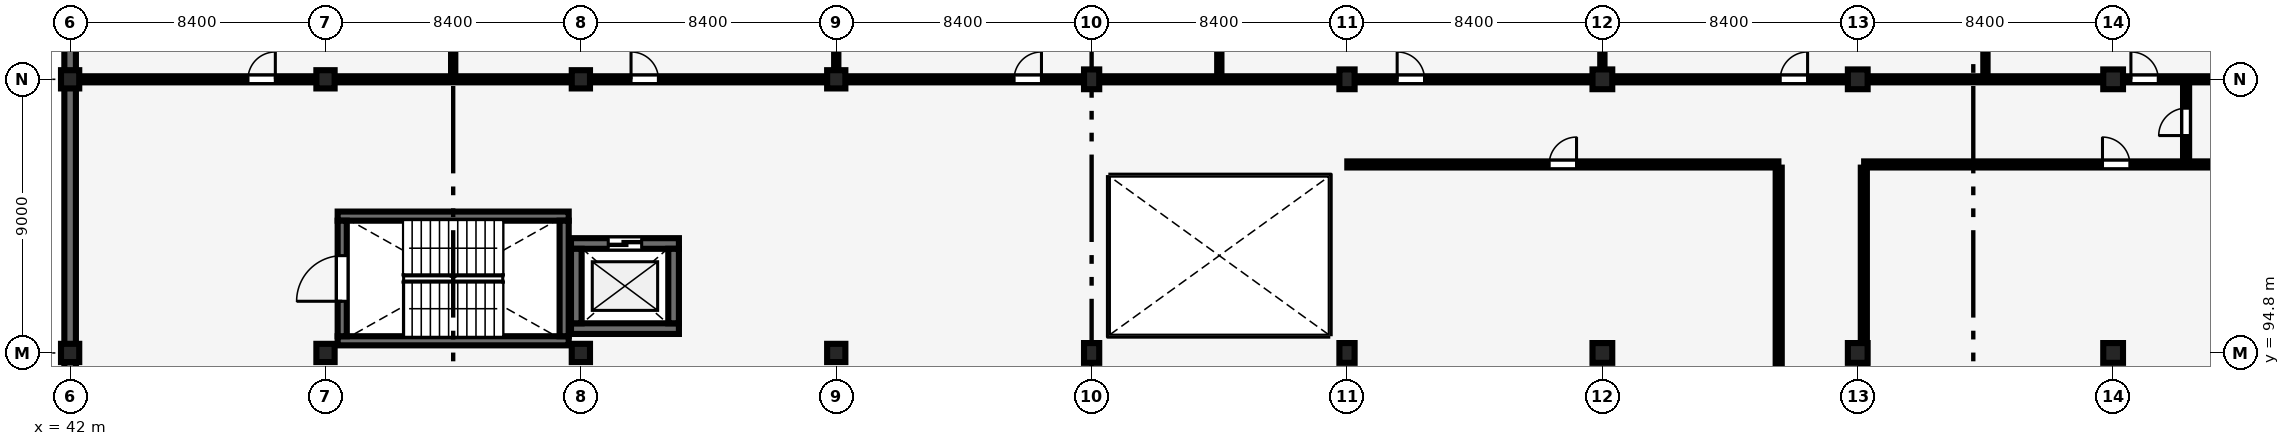
"""IFC4 building model, lengths in metres.
Left out: names, types, materials, properties, quantities, classifications, styles, units other than length and angle.
Written with IfcOpenShell. Run it as: python <this file> out.ifc"""

import sys

from ifc_helpers import new_model, si_unit, direction, frame, frame_2d, origin, origin_2d, place, context, subcontext, project, spatial, rectangle, extrude, element, fill, save


model = new_model("IFC4")
c1 = context("Model", 3, precision=1e-05, world=origin(), true_north=direction((0.0, 1.0)))
c2 = subcontext(c1, "Body", "Model", "MODEL_VIEW")
j1 = project(units=[si_unit("LENGTHUNIT", "METRE"), si_unit("PLANEANGLEUNIT", "RADIAN")], contexts=[c1])
p1 = place(None, origin())
s1 = spatial("IfcSite", under=j1, at=p1, CompositionType="ELEMENT")
p2 = place(p1, origin())
s2 = spatial("IfcBuilding", under=s1, at=p2, CompositionType="ELEMENT")
p3 = place(p2, frame((0.0, 0.0, 4.8)))
s3 = spatial("IfcBuildingStorey", under=s2, at=p3, CompositionType="ELEMENT", Elevation=4.8)
for number, where, z_axis, x_axis in (
    (1, (42.0, 94.8, 0.0), (0.0, 0.0, 1.0), (1.0, 0.0, 0.0)),
    (2, (42.0, 103.8, 0.0), (0.0, 0.0, 1.0), (1.0, 0.0, 0.0)),
    (3, (50.4, 94.8, 0.0), (0.0, 0.0, 1.0), (1.0, 0.0, 0.0)),
    (4, (50.4, 103.8, 0.0), (0.0, 0.0, 1.0), (1.0, 0.0, 0.0)),
    (5, (58.8, 94.8, 0.0), (0.0, 0.0, 1.0), (1.0, 0.0, 0.0)),
    (6, (58.8, 103.8, 0.0), (0.0, 0.0, 1.0), (1.0, 0.0, 0.0)),
    (7, (67.2, 94.8, 0.0), (0.0, 0.0, 1.0), (1.0, 0.0, 0.0)),
    (8, (67.2, 103.8, 0.0), (0.0, 0.0, 1.0), (1.0, 0.0, 0.0)),
):
    element("IfcColumn", number, at=place(p3, frame(where, z_axis=z_axis, x_axis=x_axis)), inside=s3, PredefinedType="COLUMN", context=c2, shape_type="SweptSolid", body=[
        extrude(rectangle(XDim=0.6, YDim=0.6, at=origin_2d()), origin(), (0.0, 0.0, 1.0), 4.2),
    ])
for number, where, z_axis, x_axis in (
    (9, (75.6, 94.8, 0.0), (0.0, 0.0, 1.0), (1.0, 0.0, 0.0)),
    (10, (75.6, 103.8, 0.0), (0.0, 0.0, 1.0), (1.0, 0.0, 0.0)),
    (11, (84.0, 94.8, 0.0), (0.0, 0.0, 1.0), (1.0, 0.0, 0.0)),
    (12, (84.0, 103.8, 0.0), (0.0, 0.0, 1.0), (1.0, 0.0, 0.0)),
):
    element("IfcColumn", number, at=place(p3, frame(where, z_axis=z_axis, x_axis=x_axis)), inside=s3, PredefinedType="COLUMN", context=c2, shape_type="SweptSolid", body=[
        extrude(rectangle(XDim=0.5, YDim=0.65, at=origin_2d()), origin(), (0.0, 0.0, 1.0), 4.2),
    ])
for number, where, z_axis, x_axis in (
    (13, (92.4, 94.8, 0.0), (0.0, 0.0, 1.0), (1.0, 0.0, 0.0)),
    (14, (92.4, 103.8, 0.0), (0.0, 0.0, 1.0), (1.0, 0.0, 0.0)),
    (15, (100.8, 94.8, 0.0), (0.0, 0.0, 1.0), (1.0, 0.0, 0.0)),
    (16, (100.8, 103.8, 0.0), (0.0, 0.0, 1.0), (1.0, 0.0, 0.0)),
    (17, (109.2, 94.8, 0.0), (0.0, 0.0, 1.0), (1.0, 0.0, 0.0)),
    (18, (109.2, 103.8, 0.0), (0.0, 0.0, 1.0), (1.0, 0.0, 0.0)),
):
    element("IfcColumn", number, at=place(p3, frame(where, z_axis=z_axis, x_axis=x_axis)), inside=s3, PredefinedType="COLUMN", context=c2, shape_type="SweptSolid", body=[
        extrude(rectangle(XDim=0.65, YDim=0.65, at=origin_2d()), origin(), (0.0, 0.0, 1.0), 4.2),
    ])
p4 = place(p3, frame((42.0, 86.075, 0.0), z_axis=(0.0, 0.0, 1.0), x_axis=(0.0, 1.0, 0.0)))
e19 = element("IfcWall", 19, at=p4, inside=s3, PredefinedType="SHEAR", context=c2, shape_type="SweptSolid", body=[
    extrude(rectangle(XDim=8.45, YDim=0.38, at=frame_2d((4.225, 0.0))), origin(), (0.0, 0.0, 1.0), 3.372),
])
for number, where, z_axis, x_axis in (
    (20, (42.0, 95.075, 0.0), (0.0, 0.0, 1.0), (0.0, 1.0, 0.0)),
    (21, (42.0, 104.075, 0.0), (0.0, 0.0, 1.0), (0.0, 1.0, 0.0)),
):
    element("IfcWall", number, at=place(p3, frame(where, z_axis=z_axis, x_axis=x_axis)), inside=s3, PredefinedType="SHEAR", context=c2, shape_type="SweptSolid", body=[
        extrude(rectangle(XDim=8.45, YDim=0.38, at=frame_2d((4.225, 0.0))), origin(), (0.0, 0.0, 1.0), 3.312),
    ])
for number, where, z_axis, x_axis in (
    (22, (50.8, 95.2, 0.0), (0.0, 0.0, 1.0), (1.0, 0.0, 0.0)),
    (23, (50.8, 99.3, 0.0), (0.0, 0.0, 1.0), (1.0, 0.0, 0.0)),
):
    element("IfcWall", number, at=place(p3, frame(where, z_axis=z_axis, x_axis=x_axis)), inside=s3, PredefinedType="SHEAR", context=c2, shape_type="SweptSolid", body=[
        extrude(rectangle(XDim=7.6, YDim=0.3, at=frame_2d((3.8, 0.0))), origin(), (0.0, 0.0, 1.0), 4.025),
    ])
p5 = place(p3, frame((50.95, 95.35, 0.0), z_axis=(0.0, 0.0, 1.0), x_axis=(0.0, 1.0, 0.0)))
e24 = element("IfcWall", 24, at=p5, inside=s3, PredefinedType="SHEAR", context=c2, shape_type="SweptSolid", body=[
    extrude(rectangle(XDim=3.8, YDim=0.3, at=frame_2d((1.9, 0.0))), origin(), (0.0, 0.0, 1.0), 4.025),
])
p6 = place(p5, frame((1.15, 0.0, 0.0)))
e25 = element("IfcOpeningElement", 25, at=p6, cuts=e24, PredefinedType="OPENING", context=c2, shape_type="SweptSolid", body=[
    extrude(rectangle(XDim=1.5, YDim=2.2, at=frame_2d((0.75, 1.1))), frame((0.0, 0.16, 0.0), z_axis=(0.0, -1.0, 0.0), x_axis=(1.0, 0.0, 0.0)), (0.0, 0.0, 1.0), 0.32),
])
p7 = place(p3, frame((58.25, 95.35, 0.0), z_axis=(0.0, 0.0, 1.0), x_axis=(0.0, 1.0, 0.0)))
e26 = element("IfcWall", 26, at=p7, inside=s3, PredefinedType="SHEAR", context=c2, shape_type="SweptSolid", body=[
    extrude(rectangle(XDim=3.8, YDim=0.3, at=frame_2d((1.9, 0.0))), origin(), (0.0, 0.0, 1.0), 4.025),
])
p8 = place(p3, frame((58.475, 95.6, 0.0), z_axis=(0.0, 0.0, 1.0), x_axis=(1.0, 0.0, 0.0)))
e27 = element("IfcWall", 27, at=p8, inside=s3, PredefinedType="SHEAR", context=c2, shape_type="SweptSolid", body=[
    extrude(rectangle(XDim=3.55, YDim=0.35, at=frame_2d((1.775, 0.0))), origin(), (0.0, 0.0, 1.0), 3.92),
])
p9 = place(p3, frame((58.475, 98.4, 0.0), z_axis=(0.0, 0.0, 1.0), x_axis=(1.0, 0.0, 0.0)))
e28 = element("IfcWall", 28, at=p9, inside=s3, PredefinedType="SHEAR", context=c2, shape_type="SweptSolid", body=[
    extrude(rectangle(XDim=3.55, YDim=0.35, at=frame_2d((1.775, 0.0))), origin(), (0.0, 0.0, 1.0), 3.92),
])
p10 = place(p9, frame((1.225, 0.0, 0.0)))
e29 = element("IfcOpeningElement", 29, at=p10, cuts=e28, PredefinedType="OPENING", context=c2, shape_type="SweptSolid", body=[
    extrude(rectangle(XDim=1.1, YDim=2.2, at=frame_2d((0.55, 1.1))), frame((0.0, 0.185, 0.0), z_axis=(0.0, -1.0, 0.0), x_axis=(1.0, 0.0, 0.0)), (0.0, 0.0, 1.0), 0.37),
])
for number, where, z_axis, x_axis in (
    (30, (58.65, 95.775, 0.0), (0.0, 0.0, 1.0), (0.0, 1.0, 0.0)),
    (31, (61.85, 95.775, 0.0), (0.0, 0.0, 1.0), (0.0, 1.0, 0.0)),
):
    element("IfcWall", number, at=place(p3, frame(where, z_axis=z_axis, x_axis=x_axis)), inside=s3, PredefinedType="SHEAR", context=c2, shape_type="SweptSolid", body=[
        extrude(rectangle(XDim=2.45, YDim=0.35, at=frame_2d((1.225, 0.0))), origin(), (0.0, 0.0, 1.0), 3.92),
    ])
p11 = place(p3, frame((111.6, 101.01, 0.0), z_axis=(0.0, 0.0, 1.0), x_axis=(0.0, 1.0, 0.0)))
e32 = element("IfcWall", 32, at=p11, inside=s3, PredefinedType="PARTITIONING", context=c2, shape_type="SweptSolid", body=[
    extrude(rectangle(XDim=2.78, YDim=0.2, at=frame_2d((1.39, 0.0))), origin(), (0.0, 0.0, 1.0), 3.9),
])
p12 = place(p11, frame((0.94, 0.0, 0.0)))
e33 = element("IfcOpeningElement", 33, at=p12, cuts=e32, PredefinedType="OPENING", context=c2, shape_type="SweptSolid", body=[
    extrude(rectangle(XDim=0.9, YDim=2.1, at=frame_2d((0.45, 1.05))), frame((0.0, 0.11, 0.0), z_axis=(0.0, -1.0, 0.0), x_axis=(1.0, 0.0, 0.0)), (0.0, 0.0, 1.0), 0.22),
])
p13 = place(p3, frame((54.6, 103.905, 0.0), z_axis=(0.0, 0.0, 1.0), x_axis=(0.0, 1.0, 0.0)))
e34 = element("IfcWall", 34, at=p13, inside=s3, PredefinedType="PARTITIONING", context=c2, shape_type="SweptSolid", body=[
    extrude(rectangle(XDim=8.79, YDim=0.14, at=frame_2d((4.395, 0.0))), origin(), (0.0, 0.0, 1.0), 3.9),
])
p14 = place(p3, frame((67.2, 103.905, 0.0), z_axis=(0.0, 0.0, 1.0), x_axis=(0.0, 1.0, 0.0)))
e35 = element("IfcWall", 35, at=p14, inside=s3, PredefinedType="PARTITIONING", context=c2, shape_type="SweptSolid", body=[
    extrude(rectangle(XDim=8.73, YDim=0.14, at=frame_2d((4.365, 0.0))), origin(), (0.0, 0.0, 1.0), 3.22),
])
p15 = place(p3, frame((79.8, 103.905, 0.0), z_axis=(0.0, 0.0, 1.0), x_axis=(0.0, 1.0, 0.0)))
e36 = element("IfcWall", 36, at=p15, inside=s3, PredefinedType="PARTITIONING", context=c2, shape_type="SweptSolid", body=[
    extrude(rectangle(XDim=8.73, YDim=0.14, at=frame_2d((4.365, 0.0))), origin(), (0.0, 0.0, 1.0), 3.9),
])
p16 = place(p3, frame((92.4, 103.905, 0.0), z_axis=(0.0, 0.0, 1.0), x_axis=(0.0, 1.0, 0.0)))
e37 = element("IfcWall", 37, at=p16, inside=s3, PredefinedType="PARTITIONING", context=c2, shape_type="SweptSolid", body=[
    extrude(rectangle(XDim=8.79, YDim=0.14, at=frame_2d((4.395, 0.0))), origin(), (0.0, 0.0, 1.0), 3.27),
])
p17 = place(p3, frame((105.0, 103.905, 0.0), z_axis=(0.0, 0.0, 1.0), x_axis=(0.0, 1.0, 0.0)))
e38 = element("IfcWall", 38, at=p17, inside=s3, PredefinedType="PARTITIONING", context=c2, shape_type="SweptSolid", body=[
    extrude(rectangle(XDim=8.79, YDim=0.14, at=frame_2d((4.395, 0.0))), origin(), (0.0, 0.0, 1.0), 3.9),
])
p18 = place(p3, frame((42.195, 103.8, 0.0), z_axis=(0.0, 0.0, 1.0), x_axis=(1.0, 0.0, 0.0)))
e39 = element("IfcWall", 39, at=p18, inside=s3, PredefinedType="PARTITIONING", context=c2, shape_type="SweptSolid", body=[
    extrude(rectangle(XDim=7.895, YDim=0.2, at=frame_2d((3.948, 0.0))), origin(), (0.0, 0.0, 1.0), 3.17),
])
p19 = place(p18, frame((5.655, 0.0, 0.0)))
e40 = element("IfcOpeningElement", 40, at=p19, cuts=e39, PredefinedType="OPENING", context=c2, shape_type="SweptSolid", body=[
    extrude(rectangle(XDim=0.9, YDim=2.1, at=frame_2d((0.45, 1.05))), frame((0.0, 0.11, 0.0), z_axis=(0.0, -1.0, 0.0), x_axis=(1.0, 0.0, 0.0)), (0.0, 0.0, 1.0), 0.22),
])
p20 = place(p3, frame((50.71, 103.8, 0.0), z_axis=(0.0, 0.0, 1.0), x_axis=(1.0, 0.0, 0.0)))
e41 = element("IfcWall", 41, at=p20, inside=s3, PredefinedType="PARTITIONING", context=c2, shape_type="SweptSolid", body=[
    extrude(rectangle(XDim=7.78, YDim=0.2, at=frame_2d((3.89, 0.0))), origin(), (0.0, 0.0, 1.0), 3.12),
])
p21 = place(p3, frame((59.11, 103.8, 0.0), z_axis=(0.0, 0.0, 1.0), x_axis=(1.0, 0.0, 0.0)))
e42 = element("IfcWall", 42, at=p21, inside=s3, PredefinedType="PARTITIONING", context=c2, shape_type="SweptSolid", body=[
    extrude(rectangle(XDim=7.78, YDim=0.2, at=frame_2d((3.89, 0.0))), origin(), (0.0, 0.0, 1.0), 3.07),
])
p22 = place(p21, frame((1.34, 0.0, 0.0)))
e43 = element("IfcOpeningElement", 43, at=p22, cuts=e42, PredefinedType="OPENING", context=c2, shape_type="SweptSolid", body=[
    extrude(rectangle(XDim=0.9, YDim=2.1, at=frame_2d((0.45, 1.05))), frame((0.0, 0.11, 0.0), z_axis=(0.0, -1.0, 0.0), x_axis=(1.0, 0.0, 0.0)), (0.0, 0.0, 1.0), 0.22),
])
p23 = place(p3, frame((67.51, 103.8, 0.0), z_axis=(0.0, 0.0, 1.0), x_axis=(1.0, 0.0, 0.0)))
e44 = element("IfcWall", 44, at=p23, inside=s3, PredefinedType="PARTITIONING", context=c2, shape_type="SweptSolid", body=[
    extrude(rectangle(XDim=7.83, YDim=0.2, at=frame_2d((3.915, 0.0))), origin(), (0.0, 0.0, 1.0), 3.07),
])
p24 = place(p23, frame((5.54, 0.0, 0.0)))
e45 = element("IfcOpeningElement", 45, at=p24, cuts=e44, PredefinedType="OPENING", context=c2, shape_type="SweptSolid", body=[
    extrude(rectangle(XDim=0.9, YDim=2.1, at=frame_2d((0.45, 1.05))), frame((0.0, 0.11, 0.0), z_axis=(0.0, -1.0, 0.0), x_axis=(1.0, 0.0, 0.0)), (0.0, 0.0, 1.0), 0.22),
])
p25 = place(p3, frame((75.86, 103.8, 0.0), z_axis=(0.0, 0.0, 1.0), x_axis=(1.0, 0.0, 0.0)))
e46 = element("IfcWall", 46, at=p25, inside=s3, PredefinedType="PARTITIONING", context=c2, shape_type="SweptSolid", body=[
    extrude(rectangle(XDim=7.88, YDim=0.2, at=frame_2d((3.94, 0.0))), origin(), (0.0, 0.0, 1.0), 3.02),
])
p26 = place(p3, frame((84.26, 103.8, 0.0), z_axis=(0.0, 0.0, 1.0), x_axis=(1.0, 0.0, 0.0)))
e47 = element("IfcWall", 47, at=p26, inside=s3, PredefinedType="PARTITIONING", context=c2, shape_type="SweptSolid", body=[
    extrude(rectangle(XDim=7.805, YDim=0.2, at=frame_2d((3.902, 0.0))), origin(), (0.0, 0.0, 1.0), 2.97),
])
p27 = place(p26, frame((1.39, 0.0, 0.0)))
e48 = element("IfcOpeningElement", 48, at=p27, cuts=e47, PredefinedType="OPENING", context=c2, shape_type="SweptSolid", body=[
    extrude(rectangle(XDim=0.9, YDim=2.1, at=frame_2d((0.45, 1.05))), frame((0.0, 0.11, 0.0), z_axis=(0.0, -1.0, 0.0), x_axis=(1.0, 0.0, 0.0)), (0.0, 0.0, 1.0), 0.22),
])
p28 = place(p3, frame((92.735, 103.8, 0.0), z_axis=(0.0, 0.0, 1.0), x_axis=(1.0, 0.0, 0.0)))
e49 = element("IfcWall", 49, at=p28, inside=s3, PredefinedType="PARTITIONING", context=c2, shape_type="SweptSolid", body=[
    extrude(rectangle(XDim=7.73, YDim=0.2, at=frame_2d((3.865, 0.0))), origin(), (0.0, 0.0, 1.0), 3.17),
])
p29 = place(p28, frame((5.515, 0.0, 0.0)))
e50 = element("IfcOpeningElement", 50, at=p29, cuts=e49, PredefinedType="OPENING", context=c2, shape_type="SweptSolid", body=[
    extrude(rectangle(XDim=0.9, YDim=2.1, at=frame_2d((0.45, 1.05))), frame((0.0, 0.11, 0.0), z_axis=(0.0, -1.0, 0.0), x_axis=(1.0, 0.0, 0.0)), (0.0, 0.0, 1.0), 0.22),
])
p30 = place(p3, frame((101.135, 103.8, 0.0), z_axis=(0.0, 0.0, 1.0), x_axis=(1.0, 0.0, 0.0)))
e51 = element("IfcWall", 51, at=p30, inside=s3, PredefinedType="PARTITIONING", context=c2, shape_type="SweptSolid", body=[
    extrude(rectangle(XDim=7.73, YDim=0.2, at=frame_2d((3.865, 0.0))), origin(), (0.0, 0.0, 1.0), 3.12),
])
p31 = place(p3, frame((109.535, 103.8, 0.0), z_axis=(0.0, 0.0, 1.0), x_axis=(1.0, 0.0, 0.0)))
e52 = element("IfcWall", 52, at=p31, inside=s3, PredefinedType="PARTITIONING", context=c2, shape_type="SweptSolid", body=[
    extrude(rectangle(XDim=7.87, YDim=0.2, at=frame_2d((3.935, 0.0))), origin(), (0.0, 0.0, 1.0), 3.17),
])
p32 = place(p31, frame((0.25, 0.0, 0.0)))
e53 = element("IfcOpeningElement", 53, at=p32, cuts=e52, PredefinedType="OPENING", context=c2, shape_type="SweptSolid", body=[
    extrude(rectangle(XDim=0.9, YDim=2.1, at=frame_2d((0.45, 1.05))), frame((0.0, 0.11, 0.0), z_axis=(0.0, -1.0, 0.0), x_axis=(1.0, 0.0, 0.0)), (0.0, 0.0, 1.0), 0.22),
])
p33 = place(p3, frame((84.01, 101.0, 0.0), z_axis=(0.0, 0.0, 1.0), x_axis=(1.0, 0.0, 0.0)))
e54 = element("IfcWall", 54, at=p33, inside=s3, PredefinedType="PARTITIONING", context=c2, shape_type="SweptSolid", body=[
    extrude(rectangle(XDim=14.18, YDim=0.2, at=frame_2d((7.09, 0.0))), origin(), (0.0, 0.0, 1.0), 3.44),
])
p34 = place(p33, frame((6.64, 0.0, 0.0)))
e55 = element("IfcOpeningElement", 55, at=p34, cuts=e54, PredefinedType="OPENING", context=c2, shape_type="SweptSolid", body=[
    extrude(rectangle(XDim=0.9, YDim=2.1, at=frame_2d((0.45, 1.05))), frame((0.0, 0.11, 0.0), z_axis=(0.0, -1.0, 0.0), x_axis=(1.0, 0.0, 0.0)), (0.0, 0.0, 1.0), 0.22),
])
p35 = place(p3, frame((98.2, 85.81, 0.0), z_axis=(0.0, 0.0, 1.0), x_axis=(0.0, 1.0, 0.0)))
e56 = element("IfcWall", 56, at=p35, inside=s3, PredefinedType="PARTITIONING", context=c2, shape_type="SweptSolid", body=[
    extrude(rectangle(XDim=15.085, YDim=0.2, at=frame_2d((7.542, 0.0))), origin(), (0.0, 0.0, 1.0), 3.9),
])
p36 = place(p3, frame((101.01, 101.0, 0.0), z_axis=(0.0, 0.0, 1.0), x_axis=(1.0, 0.0, 0.0)))
e57 = element("IfcWall", 57, at=p36, inside=s3, PredefinedType="PARTITIONING", context=c2, shape_type="SweptSolid", body=[
    extrude(rectangle(XDim=16.395, YDim=0.2, at=frame_2d((8.198, 0.0))), origin(), (0.0, 0.0, 1.0), 3.44),
])
p37 = place(p36, frame((7.84, 0.0, 0.0)))
e58 = element("IfcOpeningElement", 58, at=p37, cuts=e57, PredefinedType="OPENING", context=c2, shape_type="SweptSolid", body=[
    extrude(rectangle(XDim=0.9, YDim=2.1, at=frame_2d((0.45, 1.05))), frame((0.0, 0.11, 0.0), z_axis=(0.0, -1.0, 0.0), x_axis=(1.0, 0.0, 0.0)), (0.0, 0.0, 1.0), 0.22),
])
p38 = place(p3, frame((101.0, 86.135, 0.0), z_axis=(0.0, 0.0, 1.0), x_axis=(0.0, 1.0, 0.0)))
e59 = element("IfcWall", 59, at=p38, inside=s3, PredefinedType="PARTITIONING", context=c2, shape_type="SweptSolid", body=[
    extrude(rectangle(XDim=8.33, YDim=0.2, at=frame_2d((4.165, 0.0))), origin(), (0.0, 0.0, 1.0), 2.95),
])
p39 = place(p3, frame((101.0, 95.135, 0.0), z_axis=(0.0, 0.0, 1.0), x_axis=(0.0, 1.0, 0.0)))
e60 = element("IfcWall", 60, at=p39, inside=s3, PredefinedType="PARTITIONING", context=c2, shape_type="SweptSolid", body=[
    extrude(rectangle(XDim=5.76, YDim=0.2, at=frame_2d((2.88, 0.0))), origin(), (0.0, 0.0, 1.0), 2.97),
])
p40 = place(p6, origin())
e61 = element("IfcDoor", 61, at=p40, inside=s3, OperationType="DOUBLE_DOOR_SINGLE_SWING", PredefinedType="DOOR", context=c2, shape_type="SweptSolid", body=[
    extrude(rectangle(XDim=1.5, YDim=2.2, at=frame_2d((0.75, 1.1))), frame((0.0, 0.025, 0.0), z_axis=(0.0, -1.0, 0.0), x_axis=(1.0, 0.0, 0.0)), (0.0, 0.0, 1.0), 0.05),
])
fill(e25, e61)
p41 = place(p10, origin())
e62 = element("IfcDoor", 62, at=p41, inside=s3, OperationType="DOUBLE_DOOR_SLIDING", PredefinedType="DOOR", context=c2, shape_type="SweptSolid", body=[
    extrude(rectangle(XDim=1.1, YDim=2.2, at=frame_2d((0.55, 1.1))), frame((0.0, 0.025, 0.0), z_axis=(0.0, -1.0, 0.0), x_axis=(1.0, 0.0, 0.0)), (0.0, 0.0, 1.0), 0.05),
])
fill(e29, e62)
p42 = place(p12, origin())
e63 = element("IfcDoor", 63, at=p42, inside=s3, OperationType="SINGLE_SWING_LEFT", PredefinedType="DOOR", context=c2, shape_type="SweptSolid", body=[
    extrude(rectangle(XDim=0.9, YDim=2.1, at=frame_2d((0.45, 1.05))), frame((0.0, 0.025, 0.0), z_axis=(0.0, -1.0, 0.0), x_axis=(1.0, 0.0, 0.0)), (0.0, 0.0, 1.0), 0.05),
])
fill(e33, e63)
p43 = place(p19, origin())
e64 = element("IfcDoor", 64, at=p43, inside=s3, OperationType="SINGLE_SWING_RIGHT", PredefinedType="DOOR", context=c2, shape_type="SweptSolid", body=[
    extrude(rectangle(XDim=0.9, YDim=2.1, at=frame_2d((0.45, 1.05))), frame((0.0, 0.025, 0.0), z_axis=(0.0, -1.0, 0.0), x_axis=(1.0, 0.0, 0.0)), (0.0, 0.0, 1.0), 0.05),
])
fill(e40, e64)
p44 = place(p22, origin())
e65 = element("IfcDoor", 65, at=p44, inside=s3, OperationType="SINGLE_SWING_LEFT", PredefinedType="DOOR", context=c2, shape_type="SweptSolid", body=[
    extrude(rectangle(XDim=0.9, YDim=2.1, at=frame_2d((0.45, 1.05))), frame((0.0, 0.025, 0.0), z_axis=(0.0, -1.0, 0.0), x_axis=(1.0, 0.0, 0.0)), (0.0, 0.0, 1.0), 0.05),
])
fill(e43, e65)
p45 = place(p24, origin())
e66 = element("IfcDoor", 66, at=p45, inside=s3, OperationType="SINGLE_SWING_RIGHT", PredefinedType="DOOR", context=c2, shape_type="SweptSolid", body=[
    extrude(rectangle(XDim=0.9, YDim=2.1, at=frame_2d((0.45, 1.05))), frame((0.0, 0.025, 0.0), z_axis=(0.0, -1.0, 0.0), x_axis=(1.0, 0.0, 0.0)), (0.0, 0.0, 1.0), 0.05),
])
fill(e45, e66)
p46 = place(p27, origin())
e67 = element("IfcDoor", 67, at=p46, inside=s3, OperationType="SINGLE_SWING_LEFT", PredefinedType="DOOR", context=c2, shape_type="SweptSolid", body=[
    extrude(rectangle(XDim=0.9, YDim=2.1, at=frame_2d((0.45, 1.05))), frame((0.0, 0.025, 0.0), z_axis=(0.0, -1.0, 0.0), x_axis=(1.0, 0.0, 0.0)), (0.0, 0.0, 1.0), 0.05),
])
fill(e48, e67)
p47 = place(p29, origin())
e68 = element("IfcDoor", 68, at=p47, inside=s3, OperationType="SINGLE_SWING_RIGHT", PredefinedType="DOOR", context=c2, shape_type="SweptSolid", body=[
    extrude(rectangle(XDim=0.9, YDim=2.1, at=frame_2d((0.45, 1.05))), frame((0.0, 0.025, 0.0), z_axis=(0.0, -1.0, 0.0), x_axis=(1.0, 0.0, 0.0)), (0.0, 0.0, 1.0), 0.05),
])
fill(e50, e68)
p48 = place(p32, origin())
e69 = element("IfcDoor", 69, at=p48, inside=s3, OperationType="SINGLE_SWING_LEFT", PredefinedType="DOOR", context=c2, shape_type="SweptSolid", body=[
    extrude(rectangle(XDim=0.9, YDim=2.1, at=frame_2d((0.45, 1.05))), frame((0.0, 0.025, 0.0), z_axis=(0.0, -1.0, 0.0), x_axis=(1.0, 0.0, 0.0)), (0.0, 0.0, 1.0), 0.05),
])
fill(e53, e69)
p49 = place(p34, origin())
e70 = element("IfcDoor", 70, at=p49, inside=s3, OperationType="SINGLE_SWING_RIGHT", PredefinedType="DOOR", context=c2, shape_type="SweptSolid", body=[
    extrude(rectangle(XDim=0.9, YDim=2.1, at=frame_2d((0.45, 1.05))), frame((0.0, 0.025, 0.0), z_axis=(0.0, -1.0, 0.0), x_axis=(1.0, 0.0, 0.0)), (0.0, 0.0, 1.0), 0.05),
])
fill(e55, e70)
p50 = place(p37, origin())
e71 = element("IfcDoor", 71, at=p50, inside=s3, OperationType="SINGLE_SWING_LEFT", PredefinedType="DOOR", context=c2, shape_type="SweptSolid", body=[
    extrude(rectangle(XDim=0.9, YDim=2.1, at=frame_2d((0.45, 1.05))), frame((0.0, 0.025, 0.0), z_axis=(0.0, -1.0, 0.0), x_axis=(1.0, 0.0, 0.0)), (0.0, 0.0, 1.0), 0.05),
])
fill(e58, e71)
save(model, sys.argv[1])
